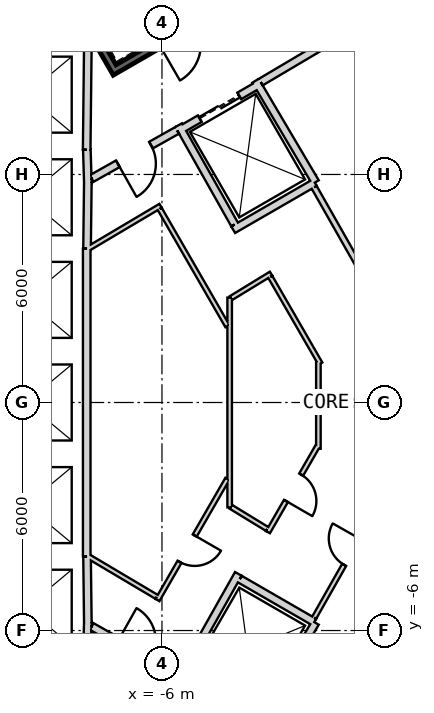
"""IFC4 building model, lengths in metres.
Left out: names, types, materials, properties, quantities, classifications, styles, units other than length and angle.
Written with IfcOpenShell. Run it as: python <this file> out.ifc"""

import sys

from ifc_helpers import new_model, si_unit, direction, frame, frame_2d, origin, place, context, subcontext, project, spatial, rectangle, extrude, element, fill, save


model = new_model("IFC4")
c1 = context("Model", 3, precision=1e-05, world=origin(), true_north=direction((0.0, 1.0)))
c2 = subcontext(c1, "Body", "Model", "MODEL_VIEW")
j1 = project(units=[si_unit("LENGTHUNIT", "METRE"), si_unit("PLANEANGLEUNIT", "RADIAN")], contexts=[c1])
p1 = place(None, origin())
s1 = spatial("IfcSite", under=j1, at=p1, CompositionType="ELEMENT")
p2 = place(p1, origin())
s2 = spatial("IfcBuilding", under=s1, at=p2, CompositionType="ELEMENT")
p3 = place(p2, frame((0.0, 0.0, 265.2)))
s3 = spatial("IfcBuildingStorey", under=s2, at=p3, CompositionType="ELEMENT", Elevation=265.2)
p4 = place(p3, frame((19.475, 2.208, 0.0), z_axis=(0.0, 0.0, 1.0), x_axis=(-0.866028369851, 0.499994862586, 0.0)))
e1 = element("IfcWall", 1, at=p4, inside=s3, PredefinedType="SHEAR", context=c2, shape_type="SweptSolid", body=[
    extrude(rectangle(XDim=31.523, YDim=0.9, at=frame_2d((15.762, 0.0))), origin(), (0.0, 0.0, 1.0), 4.0),
])
p5 = place(p4, frame((7.062, 0.0, 0.0)))
e2 = element("IfcOpeningElement", 2, at=p5, cuts=e1, PredefinedType="OPENING", context=c2, shape_type="SweptSolid", body=[
    extrude(rectangle(XDim=1.2, YDim=2.4, at=frame_2d((0.6, 1.2))), frame((0.0, 0.46, 0.0), z_axis=(0.0, -1.0, 0.0), x_axis=(1.0, 0.0, 0.0)), (0.0, 0.0, 1.0), 0.92),
])
p6 = place(p4, frame((3.612, 0.0, 0.0)))
e3 = element("IfcOpeningElement", 3, at=p6, cuts=e1, PredefinedType="OPENING", context=c2, shape_type="SweptSolid", body=[
    extrude(rectangle(XDim=1.2, YDim=2.4, at=frame_2d((0.6, 1.2))), frame((0.0, 0.46, 0.0), z_axis=(0.0, -1.0, 0.0), x_axis=(1.0, 0.0, 0.0)), (0.0, 0.0, 1.0), 0.92),
])
p7 = place(p4, frame((26.712, 0.0, 0.0)))
e4 = element("IfcOpeningElement", 4, at=p7, cuts=e1, PredefinedType="OPENING", context=c2, shape_type="SweptSolid", body=[
    extrude(rectangle(XDim=1.2, YDim=2.4, at=frame_2d((0.6, 1.2))), frame((0.0, 0.46, 0.0), z_axis=(0.0, -1.0, 0.0), x_axis=(1.0, 0.0, 0.0)), (0.0, 0.0, 1.0), 0.92),
])
p8 = place(p3, frame((-7.825, -17.97, 0.0), z_axis=(0.0, 0.0, 1.0), x_axis=(0.866028369851, 0.499994862586, 0.0)))
e5 = element("IfcWall", 5, at=p8, inside=s3, PredefinedType="SHEAR", context=c2, shape_type="SweptSolid", body=[
    extrude(rectangle(XDim=31.523, YDim=0.9, at=frame_2d((15.762, 0.0))), origin(), (0.0, 0.0, 1.0), 4.0),
])
p9 = place(p8, frame((7.062, 0.0, 0.0)))
e6 = element("IfcOpeningElement", 6, at=p9, cuts=e5, PredefinedType="OPENING", context=c2, shape_type="SweptSolid", body=[
    extrude(rectangle(XDim=1.2, YDim=2.4, at=frame_2d((0.6, 1.2))), frame((0.0, 0.46, 0.0), z_axis=(0.0, -1.0, 0.0), x_axis=(1.0, 0.0, 0.0)), (0.0, 0.0, 1.0), 0.92),
])
p10 = place(p8, frame((9.762, 0.0, 0.0)))
e7 = element("IfcOpeningElement", 7, at=p10, cuts=e5, PredefinedType="OPENING", context=c2, shape_type="SweptSolid", body=[
    extrude(rectangle(XDim=1.2, YDim=2.4, at=frame_2d((0.6, 1.2))), frame((0.0, 0.46, 0.0), z_axis=(0.0, -1.0, 0.0), x_axis=(1.0, 0.0, 0.0)), (0.0, 0.0, 1.0), 0.92),
])
p11 = place(p8, frame((12.462, 0.0, 0.0)))
e8 = element("IfcOpeningElement", 8, at=p11, cuts=e5, PredefinedType="OPENING", context=c2, shape_type="SweptSolid", body=[
    extrude(rectangle(XDim=1.2, YDim=2.4, at=frame_2d((0.6, 1.2))), frame((0.0, 0.46, 0.0), z_axis=(0.0, -1.0, 0.0), x_axis=(1.0, 0.0, 0.0)), (0.0, 0.0, 1.0), 0.92),
])
p12 = place(p8, frame((15.162, 0.0, 0.0)))
e9 = element("IfcOpeningElement", 9, at=p12, cuts=e5, PredefinedType="OPENING", context=c2, shape_type="SweptSolid", body=[
    extrude(rectangle(XDim=1.2, YDim=2.4, at=frame_2d((0.6, 1.2))), frame((0.0, 0.46, 0.0), z_axis=(0.0, -1.0, 0.0), x_axis=(1.0, 0.0, 0.0)), (0.0, 0.0, 1.0), 0.92),
])
p13 = place(p8, frame((17.862, 0.0, 0.0)))
e10 = element("IfcOpeningElement", 10, at=p13, cuts=e5, PredefinedType="OPENING", context=c2, shape_type="SweptSolid", body=[
    extrude(rectangle(XDim=1.2, YDim=2.4, at=frame_2d((0.6, 1.2))), frame((0.0, 0.46, 0.0), z_axis=(0.0, -1.0, 0.0), x_axis=(1.0, 0.0, 0.0)), (0.0, 0.0, 1.0), 0.92),
])
p14 = place(p8, frame((20.562, 0.0, 0.0)))
e11 = element("IfcOpeningElement", 11, at=p14, cuts=e5, PredefinedType="OPENING", context=c2, shape_type="SweptSolid", body=[
    extrude(rectangle(XDim=1.2, YDim=2.4, at=frame_2d((0.6, 1.2))), frame((0.0, 0.46, 0.0), z_axis=(0.0, -1.0, 0.0), x_axis=(1.0, 0.0, 0.0)), (0.0, 0.0, 1.0), 0.92),
])
p15 = place(p8, frame((26.712, 0.0, 0.0)))
e12 = element("IfcOpeningElement", 12, at=p15, cuts=e5, PredefinedType="OPENING", context=c2, shape_type="SweptSolid", body=[
    extrude(rectangle(XDim=1.2, YDim=2.4, at=frame_2d((0.6, 1.2))), frame((0.0, 0.46, 0.0), z_axis=(0.0, -1.0, 0.0), x_axis=(1.0, 0.0, 0.0)), (0.0, 0.0, 1.0), 0.92),
])
p16 = place(p8, frame((3.612, 0.0, 0.0)))
e13 = element("IfcOpeningElement", 13, at=p16, cuts=e5, PredefinedType="OPENING", context=c2, shape_type="SweptSolid", body=[
    extrude(rectangle(XDim=1.2, YDim=2.4, at=frame_2d((0.6, 1.2))), frame((0.0, 0.46, 0.0), z_axis=(0.0, -1.0, 0.0), x_axis=(1.0, 0.0, 0.0)), (0.0, 0.0, 1.0), 0.92),
])
p17 = place(p3, frame((-7.951, 9.35, 0.0), z_axis=(0.0, 0.0, 1.0), x_axis=(-0.011120469654, -0.999938165666, 0.0)))
e14 = element("IfcWall", 14, at=p17, inside=s3, PredefinedType="PLUMBINGWALL", context=c2, shape_type="SweptSolid", body=[
    extrude(rectangle(XDim=2.7, YDim=0.2, at=frame_2d((1.35, 0.0))), origin(), (0.0, 0.0, 1.0), 3.7),
])
p18 = place(p3, frame((-7.977, 6.65, 0.0), z_axis=(0.0, 0.0, 1.0), x_axis=(0.030861509705, -0.999523670164, 0.0)))
e15 = element("IfcWall", 15, at=p18, inside=s3, PredefinedType="PLUMBINGWALL", context=c2, shape_type="SweptSolid", body=[
    extrude(rectangle(XDim=0.878, YDim=0.2, at=frame_2d((0.439, 0.0))), origin(), (0.0, 0.0, 1.0), 3.7),
])
p19 = place(p3, frame((-7.949, 5.895, 0.0), z_axis=(0.0, 0.0, 1.0), x_axis=(-0.012042535896, -0.999927486035, 0.0)))
e16 = element("IfcWall", 16, at=p19, inside=s3, PredefinedType="PLUMBINGWALL", context=c2, shape_type="SweptSolid", body=[
    extrude(rectangle(XDim=1.845, YDim=0.2, at=frame_2d((0.922, 0.0))), origin(), (0.0, 0.0, 1.0), 3.7),
])
p20 = place(p3, frame((-7.98, 4.05, 0.0), z_axis=(0.0, 0.0, 1.0), x_axis=(0.0, -1.0, 0.0)))
e17 = element("IfcWall", 17, at=p20, inside=s3, PredefinedType="PLUMBINGWALL", context=c2, shape_type="SweptSolid", body=[
    extrude(rectangle(XDim=8.1, YDim=0.2, at=frame_2d((4.05, 0.0))), origin(), (0.0, 0.0, 1.0), 3.7),
])
p21 = place(p3, frame((-7.95, -5.772, 0.0), z_axis=(0.0, 0.0, 1.0), x_axis=(-0.030803413295, -0.999525462272, 0.0)))
e18 = element("IfcWall", 18, at=p21, inside=s3, PredefinedType="PLUMBINGWALL", context=c2, shape_type="SweptSolid", body=[
    extrude(rectangle(XDim=1.078, YDim=0.2, at=frame_2d((0.539, 0.0))), origin(), (0.0, 0.0, 1.0), 3.7),
])
p22 = place(p3, frame((-7.971, -4.05, 0.0), z_axis=(0.0, 0.0, 1.0), x_axis=(0.012042535896, -0.999927486035, 0.0)))
e19 = element("IfcWall", 19, at=p22, inside=s3, PredefinedType="PLUMBINGWALL", context=c2, shape_type="SweptSolid", body=[
    extrude(rectangle(XDim=1.845, YDim=0.2, at=frame_2d((0.922, 0.0))), origin(), (0.0, 0.0, 1.0), 3.7),
])
p23 = place(p3, frame((-11.245, 15.678, -0.3), z_axis=(0.0, 0.0, 1.0), x_axis=(0.499977274689, -0.866038523851, 0.0)))
e20 = element("IfcWall", 20, at=p23, inside=s3, PredefinedType="SHEAR", context=c2, shape_type="SweptSolid", body=[
    extrude(rectangle(XDim=8.1, YDim=0.2, at=frame_2d((4.05, 0.0))), origin(), (0.0, 0.0, 1.0), 4.0),
])
p24 = place(p3, frame((-7.159, 8.8, -0.3), z_axis=(0.0, 0.0, 1.0), x_axis=(0.866047807691, 0.499961193289, 0.0)))
e21 = element("IfcWall", 21, at=p24, inside=s3, PredefinedType="SHEAR", context=c2, shape_type="SweptSolid", body=[
    extrude(rectangle(XDim=3.6, YDim=0.2, at=frame_2d((1.8, 0.0))), origin(), (0.0, 0.0, 1.0), 4.0),
])
p25 = place(p24, frame((1.25, 0.0, 0.3)))
e22 = element("IfcOpeningElement", 22, at=p25, cuts=e21, PredefinedType="OPENING", context=c2, shape_type="SweptSolid", body=[
    extrude(rectangle(XDim=1.1, YDim=2.1, at=frame_2d((0.55, 1.05))), frame((0.0, 0.11, 0.0), z_axis=(0.0, -1.0, 0.0), x_axis=(1.0, 0.0, 0.0)), (0.0, 0.0, 1.0), 0.22),
])
p26 = place(p3, frame((-5.524, 7.168, 0.0), z_axis=(0.0, 0.0, 1.0), x_axis=(0.866024647952, 0.500001309137, 0.0)))
e23 = element("IfcWall", 23, at=p26, inside=s3, PredefinedType="PLUMBINGWALL", context=c2, shape_type="SweptSolid", body=[
    extrude(rectangle(XDim=2.4, YDim=0.2, at=frame_2d((1.2, 0.0))), origin(), (0.0, 0.0, 1.0), 3.7),
])
p27 = place(p26, frame((0.6, 0.0, 0.0)))
e24 = element("IfcOpeningElement", 24, at=p27, cuts=e23, PredefinedType="OPENING", context=c2, shape_type="SweptSolid", body=[
    extrude(rectangle(XDim=1.2, YDim=2.4, at=frame_2d((0.6, 1.2))), frame((0.0, 0.11, 0.0), z_axis=(0.0, -1.0, 0.0), x_axis=(1.0, 0.0, 0.0)), (0.0, 0.0, 1.0), 0.22),
])
p28 = place(p3, frame((-3.538, 8.465, 0.0), z_axis=(0.0, 0.0, 1.0), x_axis=(0.508647062354, -0.860975125052, 0.0)))
e25 = element("IfcWall", 25, at=p28, inside=s3, PredefinedType="PLUMBINGWALL", context=c2, shape_type="SweptSolid", body=[
    extrude(rectangle(XDim=3.1, YDim=0.2, at=frame_2d((1.55, 0.0))), origin(), (0.0, 0.0, 1.0), 3.7),
])
p29 = place(p3, frame((-1.979, 5.786, 0.0), z_axis=(0.0, 0.0, 1.0), x_axis=(-0.866016689309, -0.500015093611, 0.0)))
e26 = element("IfcWall", 26, at=p29, inside=s3, PredefinedType="PLUMBINGWALL", context=c2, shape_type="SweptSolid", body=[
    extrude(rectangle(XDim=2.479, YDim=0.2, at=frame_2d((1.24, 0.0))), origin(), (0.0, 0.0, 1.0), 3.7),
])
p30 = place(p3, frame((-5.562, 7.296, 0.0), z_axis=(0.0, 0.0, 1.0), x_axis=(0.49134651263, -0.870964180966, 0.0)))
e27 = element("IfcWall", 27, at=p30, inside=s3, PredefinedType="PLUMBINGWALL", context=c2, shape_type="SweptSolid", body=[
    extrude(rectangle(XDim=3.0, YDim=0.2, at=frame_2d((1.5, 0.0))), origin(), (0.0, 0.0, 1.0), 3.7),
])
p31 = place(p3, frame((-1.961, -5.796, 0.0), z_axis=(0.0, 0.0, 1.0), x_axis=(-0.508647062354, -0.860975125052, 0.0)))
e28 = element("IfcWall", 28, at=p31, inside=s3, PredefinedType="PLUMBINGWALL", context=c2, shape_type="SweptSolid", body=[
    extrude(rectangle(XDim=3.1, YDim=0.2, at=frame_2d((1.55, 0.0))), origin(), (0.0, 0.0, 1.0), 3.7),
])
p32 = place(p3, frame((-3.99, -4.509, 0.0), z_axis=(0.0, 0.0, 1.0), x_axis=(-0.491358283181, -0.870957540612, 0.0)))
e29 = element("IfcWall", 29, at=p32, inside=s3, PredefinedType="PLUMBINGWALL", context=c2, shape_type="SweptSolid", body=[
    extrude(rectangle(XDim=3.2, YDim=0.2, at=frame_2d((1.6, 0.0))), origin(), (0.0, 0.0, 1.0), 3.7),
])
p33 = place(p3, frame((-3.953, -4.646, 0.0), z_axis=(0.0, 0.0, 1.0), x_axis=(0.866065302921, -0.4999308863, 0.0)))
e30 = element("IfcWall", 30, at=p33, inside=s3, PredefinedType="PLUMBINGWALL", context=c2, shape_type="SweptSolid", body=[
    extrude(rectangle(XDim=2.264, YDim=0.2, at=frame_2d((1.132, 0.0))), origin(), (0.0, 0.0, 1.0), 3.7),
])
p34 = place(p3, frame((7.497, 4.886, 0.0), z_axis=(0.0, 0.0, 1.0), x_axis=(-0.867541725638, 0.497364407931, 0.0)))
e31 = element("IfcWall", 31, at=p34, inside=s3, PredefinedType="PLUMBINGWALL", context=c2, shape_type="SweptSolid", body=[
    extrude(rectangle(XDim=9.822, YDim=0.15, at=frame_2d((4.911, 0.0))), origin(), (0.0, 0.0, 1.0), 3.7),
])
p35 = place(p34, frame((2.3, 0.0, 0.0)))
e32 = element("IfcOpeningElement", 32, at=p35, cuts=e31, PredefinedType="OPENING", context=c2, shape_type="SweptSolid", body=[
    extrude(rectangle(XDim=0.8, YDim=2.1, at=frame_2d((0.4, 1.05))), frame((0.0, 0.085, 0.0), z_axis=(0.0, -1.0, 0.0), x_axis=(1.0, 0.0, 0.0)), (0.0, 0.0, 1.0), 0.17),
])
p36 = place(p3, frame((-1.179, 9.745, 0.0), z_axis=(0.0, 0.0, 1.0), x_axis=(-0.860630814782, -0.509229418482, 0.0)))
e33 = element("IfcWall", 33, at=p36, inside=s3, PredefinedType="PARTITIONING", context=c2, shape_type="SweptSolid", body=[
    extrude(rectangle(XDim=2.582, YDim=0.2, at=frame_2d((1.291, 0.0))), origin(), (0.0, 0.0, 1.0), 3.7),
])
p37 = place(p3, frame((-5.6, 7.16, 0.0), z_axis=(0.0, 0.0, 1.0), x_axis=(-0.871363259478, -0.490638431059, 0.0)))
e34 = element("IfcWall", 34, at=p37, inside=s3, PredefinedType="PARTITIONING", context=c2, shape_type="SweptSolid", body=[
    extrude(rectangle(XDim=2.581, YDim=0.2, at=frame_2d((1.291, 0.0))), origin(), (0.0, 0.0, 1.0), 3.7),
])
p38 = place(p37, frame((0.791, 0.0, 0.0)))
e35 = element("IfcOpeningElement", 35, at=p38, cuts=e34, PredefinedType="OPENING", context=c2, shape_type="SweptSolid", body=[
    extrude(rectangle(XDim=1.0, YDim=2.1, at=frame_2d((0.5, 1.05))), frame((0.0, 0.11, 0.0), z_axis=(0.0, -1.0, 0.0), x_axis=(1.0, 0.0, 0.0)), (0.0, 0.0, 1.0), 0.22),
])
p39 = place(p3, frame((-7.849, -5.894, 0.0), z_axis=(0.0, 0.0, 1.0), x_axis=(0.871363259478, -0.490638431059, 0.0)))
e36 = element("IfcWall", 36, at=p39, inside=s3, PredefinedType="PARTITIONING", context=c2, shape_type="SweptSolid", body=[
    extrude(rectangle(XDim=2.581, YDim=0.2, at=frame_2d((1.291, 0.0))), origin(), (0.0, 0.0, 1.0), 3.7),
])
p40 = place(p39, frame((0.791, 0.0, 0.0)))
e37 = element("IfcOpeningElement", 37, at=p40, cuts=e36, PredefinedType="OPENING", context=c2, shape_type="SweptSolid", body=[
    extrude(rectangle(XDim=1.0, YDim=2.1, at=frame_2d((0.5, 1.05))), frame((0.0, 0.11, 0.0), z_axis=(0.0, -1.0, 0.0), x_axis=(1.0, 0.0, 0.0)), (0.0, 0.0, 1.0), 0.22),
])
p41 = place(p3, frame((-1.994, 5.661, 0.0), z_axis=(0.0, 0.0, 1.0), x_axis=(0.493780191404, -0.869586753911, 0.0)))
e38 = element("IfcWall", 38, at=p41, inside=s3, PredefinedType="PLUMBINGWALL", context=c2, shape_type="SweptSolid", body=[
    extrude(rectangle(XDim=3.971, YDim=0.15, at=frame_2d((1.986, 0.0))), origin(), (0.0, 0.0, 1.0), 3.7),
])
p42 = place(p3, frame((0.029, -2.099, 0.0), z_axis=(0.0, 0.0, 1.0), x_axis=(-0.49376265119, -0.869596713592, 0.0)))
e39 = element("IfcWall", 39, at=p42, inside=s3, PredefinedType="PARTITIONING", context=c2, shape_type="SweptSolid", body=[
    extrude(rectangle(XDim=4.097, YDim=0.12, at=frame_2d((2.048, 0.0))), origin(), (0.0, 0.0, 1.0), 3.7),
])
p43 = place(p42, frame((1.7, 0.0, 0.0)))
e40 = element("IfcOpeningElement", 40, at=p43, cuts=e39, PredefinedType="OPENING", context=c2, shape_type="SweptSolid", body=[
    extrude(rectangle(XDim=0.8, YDim=2.1, at=frame_2d((0.4, 1.05))), frame((0.0, 0.07, 0.0), z_axis=(0.0, -1.0, 0.0), x_axis=(1.0, 0.0, 0.0)), (0.0, 0.0, 1.0), 0.14),
])
p44 = place(p3, frame((-4.219, -2.76, 0.0), z_axis=(0.0, 0.0, 1.0), x_axis=(0.0, 1.0, 0.0)))
e41 = element("IfcWall", 41, at=p44, inside=s3, PredefinedType="PARTITIONING", context=c2, shape_type="SweptSolid", body=[
    extrude(rectangle(XDim=5.521, YDim=0.12, at=frame_2d((2.76, 0.0))), origin(), (0.0, 0.0, 1.0), 3.7),
])
p45 = place(p3, frame((-6.118, -5.197, 0.0), z_axis=(0.0, 0.0, 1.0), x_axis=(0.499979045085, 0.866037501772, 0.0)))
e42 = element("IfcWall", 42, at=p45, inside=s3, PredefinedType="PARTITIONING", context=c2, shape_type="SweptSolid", body=[
    extrude(rectangle(XDim=3.679, YDim=0.12, at=frame_2d((1.839, 0.0))), origin(), (0.0, 0.0, 1.0), 3.7),
])
p46 = place(p45, frame((1.16, 0.0, 0.0)))
e43 = element("IfcOpeningElement", 43, at=p46, cuts=e42, PredefinedType="OPENING", context=c2, shape_type="SweptSolid", body=[
    extrude(rectangle(XDim=0.8, YDim=2.1, at=frame_2d((0.4, 1.05))), frame((0.0, 0.07, 0.0), z_axis=(0.0, -1.0, 0.0), x_axis=(1.0, 0.0, 0.0)), (0.0, 0.0, 1.0), 0.14),
])
p47 = place(p3, frame((-7.95, -4.041, 0.0), z_axis=(0.0, 0.0, 1.0), x_axis=(0.860112457103, -0.510104461004, 0.0)))
e44 = element("IfcWall", 44, at=p47, inside=s3, PredefinedType="PARTITIONING", context=c2, shape_type="SweptSolid", body=[
    extrude(rectangle(XDim=2.104, YDim=0.12, at=frame_2d((1.052, 0.0))), origin(), (0.0, 0.0, 1.0), 3.7),
])
p48 = place(p3, frame((-6.037, 5.176, 0.0), z_axis=(0.0, 0.0, 1.0), x_axis=(-0.860106072674, -0.510115225953, 0.0)))
e45 = element("IfcWall", 45, at=p48, inside=s3, PredefinedType="PARTITIONING", context=c2, shape_type="SweptSolid", body=[
    extrude(rectangle(XDim=2.225, YDim=0.12, at=frame_2d((1.112, 0.0))), origin(), (0.0, 0.0, 1.0), 3.7),
])
p49 = place(p3, frame((-4.279, 2.011, 0.0), z_axis=(0.0, 0.0, 1.0), x_axis=(-0.500027278734, 0.866009653827, 0.0)))
e46 = element("IfcWall", 46, at=p49, inside=s3, PredefinedType="PARTITIONING", context=c2, shape_type="SweptSolid", body=[
    extrude(rectangle(XDim=3.559, YDim=0.12, at=frame_2d((1.779, 0.0))), origin(), (0.0, 0.0, 1.0), 3.7),
])
p50 = place(p3, frame((-3.13, 3.391, 0.0), z_axis=(0.0, 0.0, 1.0), x_axis=(-0.853228335638, -0.521537541567, 0.0)))
e47 = element("IfcWall", 47, at=p50, inside=s3, PredefinedType="PARTITIONING", context=c2, shape_type="SweptSolid", body=[
    extrude(rectangle(XDim=1.241, YDim=0.12, at=frame_2d((0.621, 0.0))), origin(), (0.0, 0.0, 1.0), 3.7),
])
p51 = place(p3, frame((-1.832, 1.022, 0.0), z_axis=(0.0, 0.0, 1.0), x_axis=(-0.500000102728, 0.866025344474, 0.0)))
e48 = element("IfcWall", 48, at=p51, inside=s3, PredefinedType="PARTITIONING", context=c2, shape_type="SweptSolid", body=[
    extrude(rectangle(XDim=2.639, YDim=0.12, at=frame_2d((1.319, 0.0))), origin(), (0.0, 0.0, 1.0), 3.7),
])
p52 = place(p3, frame((-1.884, -1.216, 0.0), z_axis=(0.0, 0.0, 1.0), x_axis=(0.0, 1.0, 0.0)))
e49 = element("IfcWall", 49, at=p52, inside=s3, PredefinedType="PARTITIONING", context=c2, shape_type="SweptSolid", body=[
    extrude(rectangle(XDim=2.31, YDim=0.12, at=frame_2d((1.155, 0.0))), origin(), (0.0, 0.0, 1.0), 3.7),
])
p53 = place(p3, frame((-3.211, -3.412, 0.0), z_axis=(0.0, 0.0, 1.0), x_axis=(0.500013727357, 0.866017478146, 0.0)))
e50 = element("IfcWall", 50, at=p53, inside=s3, PredefinedType="PARTITIONING", context=c2, shape_type="SweptSolid", body=[
    extrude(rectangle(XDim=2.636, YDim=0.12, at=frame_2d((1.318, 0.0))), origin(), (0.0, 0.0, 1.0), 3.7),
])
p54 = place(p53, frame((0.948, 0.0, 0.0)))
e51 = element("IfcOpeningElement", 51, at=p54, cuts=e50, PredefinedType="OPENING", context=c2, shape_type="SweptSolid", body=[
    extrude(rectangle(XDim=0.8, YDim=2.1, at=frame_2d((0.4, 1.05))), frame((0.0, 0.07, 0.0), z_axis=(0.0, -1.0, 0.0), x_axis=(1.0, 0.0, 0.0)), (0.0, 0.0, 1.0), 0.14),
])
p55 = place(p3, frame((-4.189, -2.744, 0.0), z_axis=(0.0, 0.0, 1.0), x_axis=(0.853217230587, -0.521555708845, 0.0)))
e52 = element("IfcWall", 52, at=p55, inside=s3, PredefinedType="PARTITIONING", context=c2, shape_type="SweptSolid", body=[
    extrude(rectangle(XDim=1.121, YDim=0.12, at=frame_2d((0.561, 0.0))), origin(), (0.0, 0.0, 1.0), 3.7),
])
p56 = place(p38, origin())
e53 = element("IfcDoor", 53, at=p56, inside=s3, OperationType="SINGLE_SWING_LEFT", PredefinedType="USERDEFINED", context=c2, shape_type="SweptSolid", body=[
    extrude(rectangle(XDim=1.0, YDim=2.1, at=frame_2d((0.5, 1.05))), frame((0.0, 0.025, 0.0), z_axis=(0.0, -1.0, 0.0), x_axis=(1.0, 0.0, 0.0)), (0.0, 0.0, 1.0), 0.05),
])
fill(e35, e53)
p57 = place(p27, origin())
e54 = element("IfcDoor", 54, at=p57, inside=s3, OperationType="SLIDING_TO_LEFT", PredefinedType="USERDEFINED", context=c2, shape_type="SweptSolid", body=[
    extrude(rectangle(XDim=1.2, YDim=2.4, at=frame_2d((0.6, 1.2))), frame((0.0, 0.025, 0.0), z_axis=(0.0, -1.0, 0.0), x_axis=(1.0, 0.0, 0.0)), (0.0, 0.0, 1.0), 0.05),
])
fill(e24, e54)
p58 = place(p43, origin())
e55 = element("IfcDoor", 55, at=p58, inside=s3, OperationType="SINGLE_SWING_RIGHT", PredefinedType="USERDEFINED", context=c2, shape_type="SweptSolid", body=[
    extrude(rectangle(XDim=0.8, YDim=2.1, at=frame_2d((0.4, 1.05))), frame((0.0, 0.025, 0.0), z_axis=(0.0, -1.0, 0.0), x_axis=(1.0, 0.0, 0.0)), (0.0, 0.0, 1.0), 0.05),
])
fill(e40, e55)
p59 = place(p46, origin())
e56 = element("IfcDoor", 56, at=p59, inside=s3, OperationType="SINGLE_SWING_LEFT", PredefinedType="USERDEFINED", context=c2, shape_type="SweptSolid", body=[
    extrude(rectangle(XDim=0.8, YDim=2.1, at=frame_2d((0.4, 1.05))), frame((0.0, 0.025, 0.0), z_axis=(0.0, -1.0, 0.0), x_axis=(1.0, 0.0, 0.0)), (0.0, 0.0, 1.0), 0.05),
])
fill(e43, e56)
p60 = place(p54, origin())
e57 = element("IfcDoor", 57, at=p60, inside=s3, OperationType="SINGLE_SWING_RIGHT", PredefinedType="USERDEFINED", context=c2, shape_type="SweptSolid", body=[
    extrude(rectangle(XDim=0.8, YDim=2.1, at=frame_2d((0.4, 1.05))), frame((0.0, 0.025, 0.0), z_axis=(0.0, -1.0, 0.0), x_axis=(1.0, 0.0, 0.0)), (0.0, 0.0, 1.0), 0.05),
])
fill(e51, e57)
save(model, sys.argv[1])
